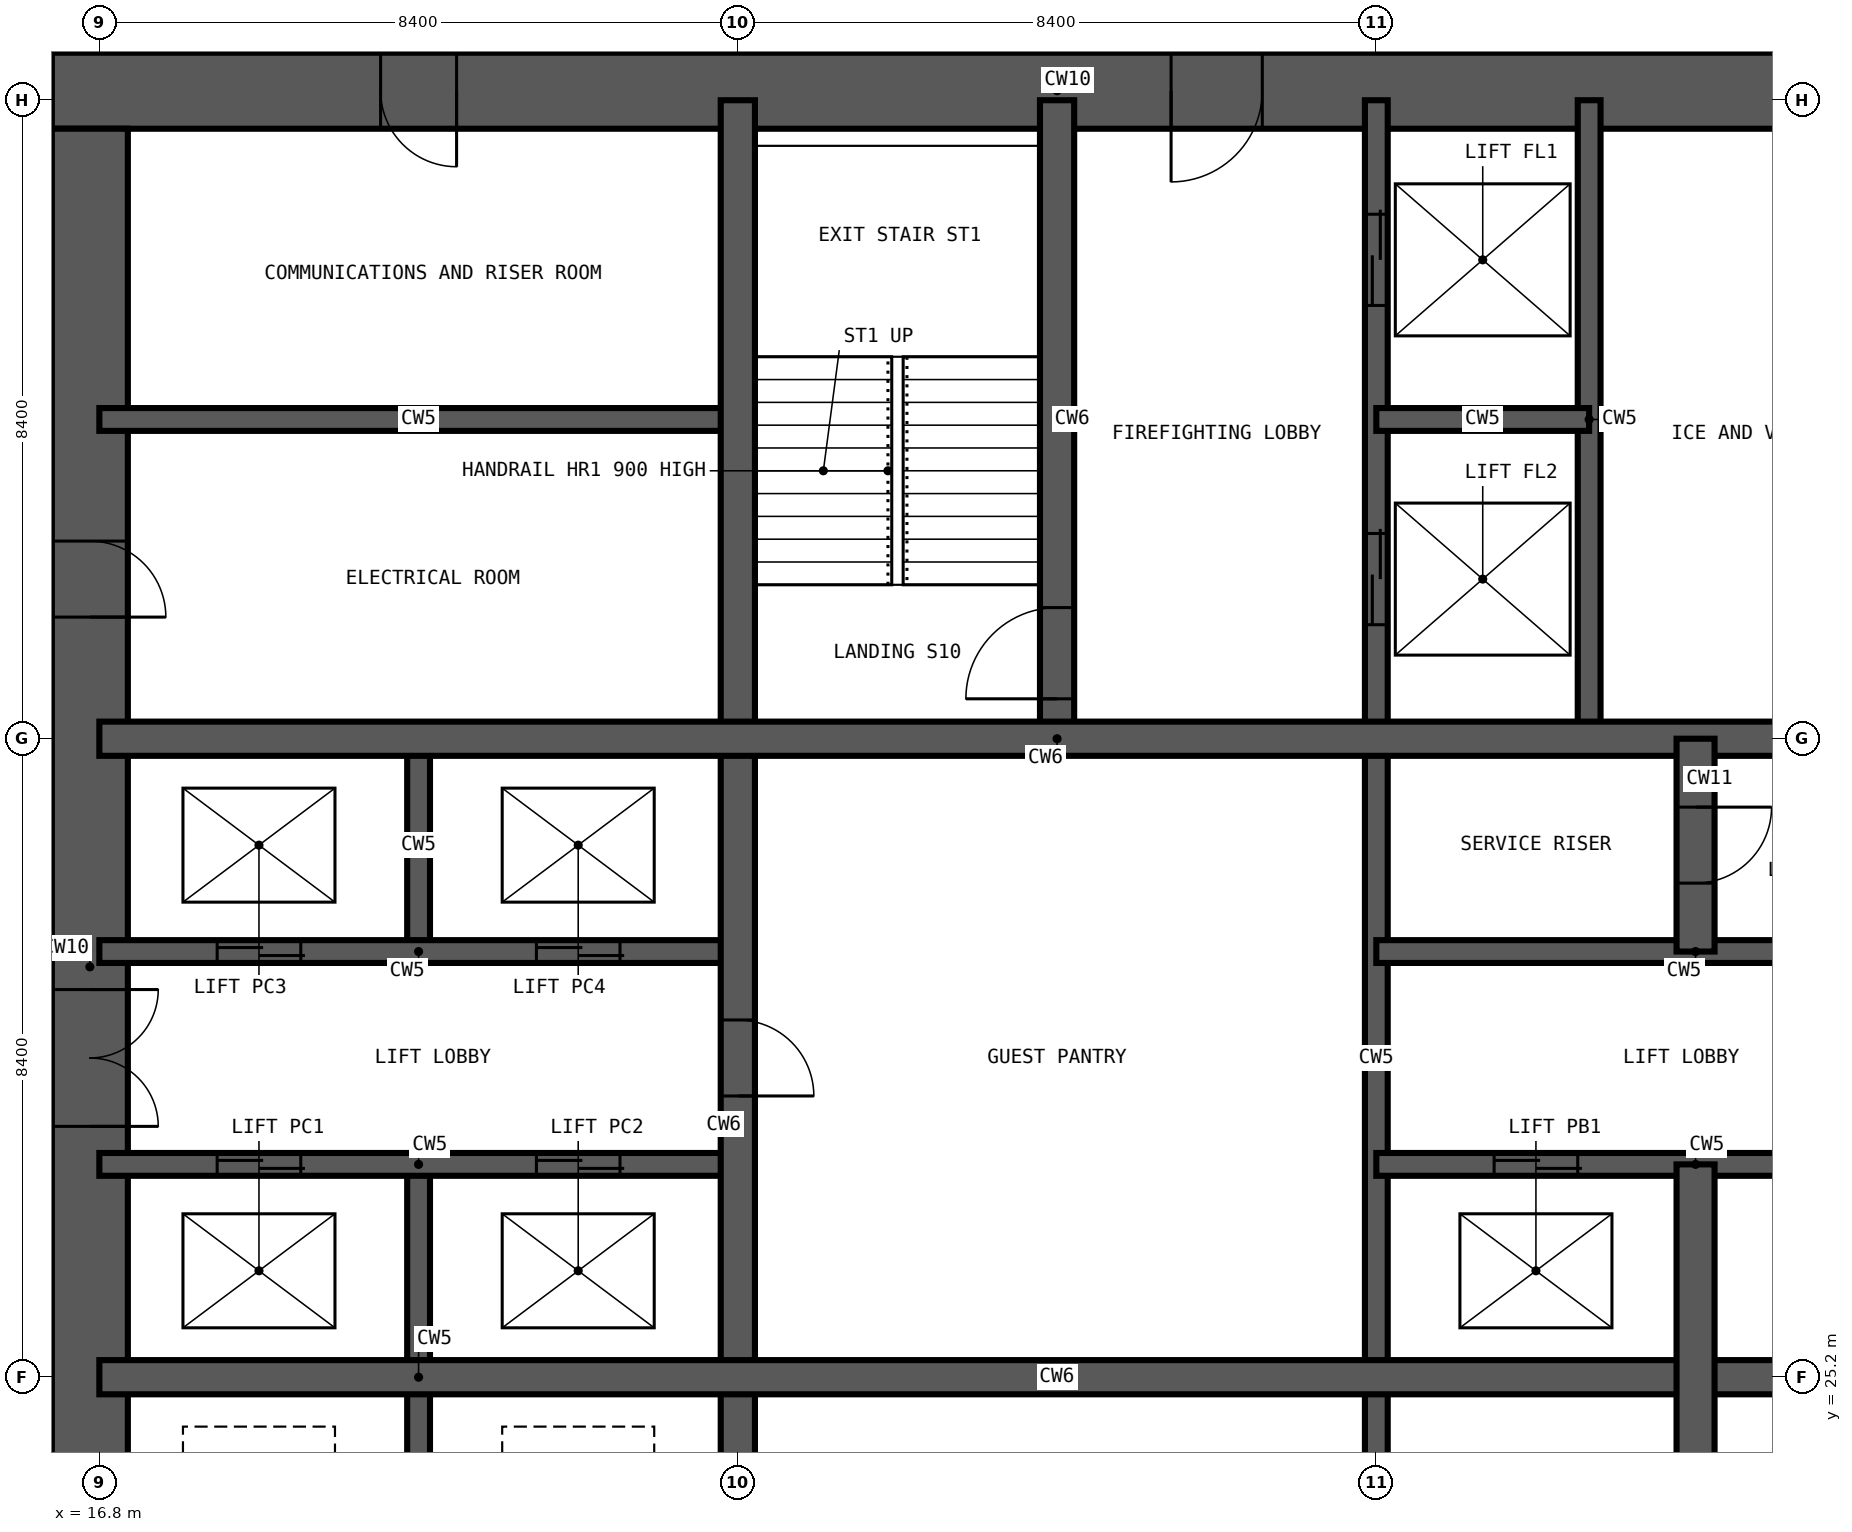
"""IFC4 building model, lengths in metres.
Left out: names, types, materials, properties, quantities, classifications, styles, units other than length and angle.
Written with IfcOpenShell. Run it as: python <this file> out.ifc"""

import sys

from ifc_helpers import new_model, si_unit, direction, frame, frame_2d, origin, place, context, subcontext, project, spatial, rectangle, extrude, element, fill, save


model = new_model("IFC4")
c1 = context("Model", 3, precision=1e-05, world=origin(), true_north=direction((0.0, 1.0)))
c2 = subcontext(c1, "Body", "Model", "MODEL_VIEW")
j1 = project(units=[si_unit("LENGTHUNIT", "METRE"), si_unit("PLANEANGLEUNIT", "RADIAN")], contexts=[c1])
p1 = place(None, origin())
s1 = spatial("IfcSite", under=j1, at=p1, CompositionType="ELEMENT")
p2 = place(p1, origin())
s2 = spatial("IfcBuilding", under=s1, at=p2, CompositionType="ELEMENT")
p3 = place(p2, frame((0.0, 0.0, 133.2)))
s3 = spatial("IfcBuildingStorey", under=s2, at=p3, CompositionType="ELEMENT", Elevation=133.2)
p4 = place(p3, frame((42.625, 42.125, -0.35), z_axis=(0.0, 0.0, 1.0), x_axis=(-1.0, 0.0, 0.0)))
e1 = element("IfcWall", 1, at=p4, inside=s3, PredefinedType="SHEAR", context=c2, shape_type="SweptSolid", body=[
    extrude(rectangle(XDim=26.45, YDim=1.0, at=frame_2d((13.225, 0.0))), origin(), (0.0, 0.0, 1.0), 3.6),
])
p5 = place(p4, frame((21.125, 0.0, 0.35)))
e2 = element("IfcOpeningElement", 2, at=p5, cuts=e1, PredefinedType="OPENING", context=c2, shape_type="SweptSolid", body=[
    extrude(rectangle(XDim=1.0, YDim=2.1, at=frame_2d((0.5, 1.05))), frame((0.0, 0.51, 0.0), z_axis=(0.0, -1.0, 0.0), x_axis=(1.0, 0.0, 0.0)), (0.0, 0.0, 1.0), 1.02),
])
p6 = place(p4, frame((10.525, 0.0, 0.35)))
e3 = element("IfcOpeningElement", 3, at=p6, cuts=e1, PredefinedType="OPENING", context=c2, shape_type="SweptSolid", body=[
    extrude(rectangle(XDim=1.2, YDim=2.2, at=frame_2d((0.6, 1.1))), frame((0.0, 0.51, 0.0), z_axis=(0.0, -1.0, 0.0), x_axis=(1.0, 0.0, 0.0)), (0.0, 0.0, 1.0), 1.02),
])
p7 = place(p3, frame((16.675, 41.625, -0.35), z_axis=(0.0, 0.0, 1.0), x_axis=(0.0, -1.0, 0.0)))
e4 = element("IfcWall", 4, at=p7, inside=s3, PredefinedType="SHEAR", context=c2, shape_type="SweptSolid", body=[
    extrude(rectangle(XDim=24.45, YDim=1.0, at=frame_2d((12.225, 0.0))), origin(), (0.0, 0.0, 1.0), 3.6),
])
p8 = place(p7, frame((11.325, 0.0, 0.35)))
e5 = element("IfcOpeningElement", 5, at=p8, cuts=e4, PredefinedType="OPENING", context=c2, shape_type="SweptSolid", body=[
    extrude(rectangle(XDim=1.8, YDim=2.2, at=frame_2d((0.9, 1.1))), frame((0.0, 0.51, 0.0), z_axis=(0.0, -1.0, 0.0), x_axis=(1.0, 0.0, 0.0)), (0.0, 0.0, 1.0), 1.02),
])
p9 = place(p7, frame((20.125, 0.0, 0.35)))
e6 = element("IfcOpeningElement", 6, at=p9, cuts=e4, PredefinedType="OPENING", context=c2, shape_type="SweptSolid", body=[
    extrude(rectangle(XDim=1.0, YDim=2.1, at=frame_2d((0.5, 1.05))), frame((0.0, 0.51, 0.0), z_axis=(0.0, -1.0, 0.0), x_axis=(1.0, 0.0, 0.0)), (0.0, 0.0, 1.0), 1.02),
])
p10 = place(p7, frame((5.425, 0.0, 0.35)))
e7 = element("IfcOpeningElement", 7, at=p10, cuts=e4, PredefinedType="OPENING", context=c2, shape_type="SweptSolid", body=[
    extrude(rectangle(XDim=1.0, YDim=2.1, at=frame_2d((0.5, 1.05))), frame((0.0, 0.51, 0.0), z_axis=(0.0, -1.0, 0.0), x_axis=(1.0, 0.0, 0.0)), (0.0, 0.0, 1.0), 1.02),
])
p11 = place(p3, frame((21.0, 22.4, -0.35), z_axis=(0.0, 0.0, 1.0), x_axis=(0.0, 1.0, 0.0)))
e8 = element("IfcWall", 8, at=p11, inside=s3, PredefinedType="SHEAR", context=c2, shape_type="SweptSolid", body=[
    extrude(rectangle(XDim=5.6, YDim=0.3, at=frame_2d((2.8, 0.0))), origin(), (0.0, 0.0, 1.0), 3.6),
])
p12 = place(p3, frame((21.0, 30.8, -0.35), z_axis=(0.0, 0.0, 1.0), x_axis=(0.0, 1.0, 0.0)))
e9 = element("IfcWall", 9, at=p12, inside=s3, PredefinedType="SHEAR", context=c2, shape_type="SweptSolid", body=[
    extrude(rectangle(XDim=2.8, YDim=0.3, at=frame_2d((1.4, 0.0))), origin(), (0.0, 0.0, 1.0), 3.6),
])
p13 = place(p3, frame((33.6, 16.8, -0.35), z_axis=(0.0, 0.0, 1.0), x_axis=(0.0, 1.0, 0.0)))
e10 = element("IfcWall", 10, at=p13, inside=s3, PredefinedType="SHEAR", context=c2, shape_type="SweptSolid", body=[
    extrude(rectangle(XDim=25.2, YDim=0.3, at=frame_2d((12.6, 0.0))), origin(), (0.0, 0.0, 1.0), 3.6),
])
p14 = place(p13, frame((22.5, 0.0, 0.35)))
e11 = element("IfcOpeningElement", 11, at=p14, cuts=e10, PredefinedType="OPENING", context=c2, shape_type="SweptSolid", body=[
    extrude(rectangle(XDim=1.2, YDim=2.2, at=frame_2d((0.6, 1.1))), frame((0.0, 0.16, 0.0), z_axis=(0.0, -1.0, 0.0), x_axis=(1.0, 0.0, 0.0)), (0.0, 0.0, 1.0), 0.32),
])
p15 = place(p13, frame((18.3, 0.0, 0.35)))
e12 = element("IfcOpeningElement", 12, at=p15, cuts=e10, PredefinedType="OPENING", context=c2, shape_type="SweptSolid", body=[
    extrude(rectangle(XDim=1.2, YDim=2.2, at=frame_2d((0.6, 1.1))), frame((0.0, 0.16, 0.0), z_axis=(0.0, -1.0, 0.0), x_axis=(1.0, 0.0, 0.0)), (0.0, 0.0, 1.0), 0.32),
])
p16 = place(p3, frame((36.4, 33.6, -0.35), z_axis=(0.0, 0.0, 1.0), x_axis=(0.0, 1.0, 0.0)))
e13 = element("IfcWall", 13, at=p16, inside=s3, PredefinedType="SHEAR", context=c2, shape_type="SweptSolid", body=[
    extrude(rectangle(XDim=8.4, YDim=0.3, at=frame_2d((4.2, 0.0))), origin(), (0.0, 0.0, 1.0), 3.6),
])
p17 = place(p3, frame((16.8, 28.0, -0.35), z_axis=(0.0, 0.0, 1.0), x_axis=(1.0, 0.0, 0.0)))
e14 = element("IfcWall", 14, at=p17, inside=s3, PredefinedType="SHEAR", context=c2, shape_type="SweptSolid", body=[
    extrude(rectangle(XDim=8.4, YDim=0.3, at=frame_2d((4.2, 0.0))), origin(), (0.0, 0.0, 1.0), 3.6),
])
p18 = place(p17, frame((1.55, 0.0, 0.35)))
e15 = element("IfcOpeningElement", 15, at=p18, cuts=e14, PredefinedType="OPENING", context=c2, shape_type="SweptSolid", body=[
    extrude(rectangle(XDim=1.1, YDim=2.2, at=frame_2d((0.55, 1.1))), frame((0.0, 0.16, 0.0), z_axis=(0.0, -1.0, 0.0), x_axis=(1.0, 0.0, 0.0)), (0.0, 0.0, 1.0), 0.32),
])
p19 = place(p17, frame((5.75, 0.0, 0.35)))
e16 = element("IfcOpeningElement", 16, at=p19, cuts=e14, PredefinedType="OPENING", context=c2, shape_type="SweptSolid", body=[
    extrude(rectangle(XDim=1.1, YDim=2.2, at=frame_2d((0.55, 1.1))), frame((0.0, 0.16, 0.0), z_axis=(0.0, -1.0, 0.0), x_axis=(1.0, 0.0, 0.0)), (0.0, 0.0, 1.0), 0.32),
])
p20 = place(p3, frame((33.6, 28.0, -0.35), z_axis=(0.0, 0.0, 1.0), x_axis=(1.0, 0.0, 0.0)))
e17 = element("IfcWall", 17, at=p20, inside=s3, PredefinedType="SHEAR", context=c2, shape_type="SweptSolid", body=[
    extrude(rectangle(XDim=8.4, YDim=0.3, at=frame_2d((4.2, 0.0))), origin(), (0.0, 0.0, 1.0), 3.6),
])
p21 = place(p20, frame((1.55, 0.0, 0.35)))
e18 = element("IfcOpeningElement", 18, at=p21, cuts=e17, PredefinedType="OPENING", context=c2, shape_type="SweptSolid", body=[
    extrude(rectangle(XDim=1.1, YDim=2.2, at=frame_2d((0.55, 1.1))), frame((0.0, 0.16, 0.0), z_axis=(0.0, -1.0, 0.0), x_axis=(1.0, 0.0, 0.0)), (0.0, 0.0, 1.0), 0.32),
])
p22 = place(p20, frame((5.75, 0.0, 0.35)))
e19 = element("IfcOpeningElement", 19, at=p22, cuts=e17, PredefinedType="OPENING", context=c2, shape_type="SweptSolid", body=[
    extrude(rectangle(XDim=1.1, YDim=2.2, at=frame_2d((0.55, 1.1))), frame((0.0, 0.16, 0.0), z_axis=(0.0, -1.0, 0.0), x_axis=(1.0, 0.0, 0.0)), (0.0, 0.0, 1.0), 0.32),
])
p23 = place(p3, frame((16.8, 30.8, -0.35), z_axis=(0.0, 0.0, 1.0), x_axis=(1.0, 0.0, 0.0)))
e20 = element("IfcWall", 20, at=p23, inside=s3, PredefinedType="SHEAR", context=c2, shape_type="SweptSolid", body=[
    extrude(rectangle(XDim=8.4, YDim=0.3, at=frame_2d((4.2, 0.0))), origin(), (0.0, 0.0, 1.0), 3.6),
])
p24 = place(p23, frame((1.55, 0.0, 0.35)))
e21 = element("IfcOpeningElement", 21, at=p24, cuts=e20, PredefinedType="OPENING", context=c2, shape_type="SweptSolid", body=[
    extrude(rectangle(XDim=1.1, YDim=2.2, at=frame_2d((0.55, 1.1))), frame((0.0, 0.16, 0.0), z_axis=(0.0, -1.0, 0.0), x_axis=(1.0, 0.0, 0.0)), (0.0, 0.0, 1.0), 0.32),
])
p25 = place(p23, frame((5.75, 0.0, 0.35)))
e22 = element("IfcOpeningElement", 22, at=p25, cuts=e20, PredefinedType="OPENING", context=c2, shape_type="SweptSolid", body=[
    extrude(rectangle(XDim=1.1, YDim=2.2, at=frame_2d((0.55, 1.1))), frame((0.0, 0.16, 0.0), z_axis=(0.0, -1.0, 0.0), x_axis=(1.0, 0.0, 0.0)), (0.0, 0.0, 1.0), 0.32),
])
for number, where, z_axis, x_axis in (
    (23, (33.6, 30.8, -0.35), (0.0, 0.0, 1.0), (1.0, 0.0, 0.0)),
    (24, (16.8, 37.8, -0.35), (0.0, 0.0, 1.0), (1.0, 0.0, 0.0)),
):
    element("IfcWall", number, at=place(p3, frame(where, z_axis=z_axis, x_axis=x_axis)), inside=s3, PredefinedType="SHEAR", context=c2, shape_type="SweptSolid", body=[
        extrude(rectangle(XDim=8.4, YDim=0.3, at=frame_2d((4.2, 0.0))), origin(), (0.0, 0.0, 1.0), 3.6),
    ])
p26 = place(p3, frame((33.6, 37.8, -0.35), z_axis=(0.0, 0.0, 1.0), x_axis=(1.0, 0.0, 0.0)))
e25 = element("IfcWall", 25, at=p26, inside=s3, PredefinedType="SHEAR", context=c2, shape_type="SweptSolid", body=[
    extrude(rectangle(XDim=2.8, YDim=0.3, at=frame_2d((1.4, 0.0))), origin(), (0.0, 0.0, 1.0), 3.6),
])
p27 = place(p3, frame((25.2, 16.8, -0.35), z_axis=(0.0, 0.0, 1.0), x_axis=(0.0, 1.0, 0.0)))
e26 = element("IfcWall", 26, at=p27, inside=s3, PredefinedType="SHEAR", context=c2, shape_type="SweptSolid", body=[
    extrude(rectangle(XDim=25.2, YDim=0.45, at=frame_2d((12.6, 0.0))), origin(), (0.0, 0.0, 1.0), 3.6),
])
p28 = place(p27, frame((12.1, 0.0, 0.35)))
e27 = element("IfcOpeningElement", 27, at=p28, cuts=e26, PredefinedType="OPENING", context=c2, shape_type="SweptSolid", body=[
    extrude(rectangle(XDim=1.0, YDim=2.1, at=frame_2d((0.5, 1.05))), frame((0.0, 0.235, 0.0), z_axis=(0.0, -1.0, 0.0), x_axis=(1.0, 0.0, 0.0)), (0.0, 0.0, 1.0), 0.47),
])
p29 = place(p3, frame((29.4, 33.6, -0.35), z_axis=(0.0, 0.0, 1.0), x_axis=(0.0, 1.0, 0.0)))
e28 = element("IfcWall", 28, at=p29, inside=s3, PredefinedType="SHEAR", context=c2, shape_type="SweptSolid", body=[
    extrude(rectangle(XDim=8.4, YDim=0.45, at=frame_2d((4.2, 0.0))), origin(), (0.0, 0.0, 1.0), 3.6),
])
p30 = place(p29, frame((0.525, 0.0, 0.35)))
e29 = element("IfcOpeningElement", 29, at=p30, cuts=e28, PredefinedType="OPENING", context=c2, shape_type="SweptSolid", body=[
    extrude(rectangle(XDim=1.2, YDim=2.2, at=frame_2d((0.6, 1.1))), frame((0.0, 0.235, 0.0), z_axis=(0.0, -1.0, 0.0), x_axis=(1.0, 0.0, 0.0)), (0.0, 0.0, 1.0), 0.47),
])
p31 = place(p3, frame((16.8, 25.2, -0.35), z_axis=(0.0, 0.0, 1.0), x_axis=(1.0, 0.0, 0.0)))
e30 = element("IfcWall", 30, at=p31, inside=s3, PredefinedType="SHEAR", context=c2, shape_type="SweptSolid", body=[
    extrude(rectangle(XDim=25.2, YDim=0.45, at=frame_2d((12.6, 0.0))), origin(), (0.0, 0.0, 1.0), 3.6),
])
p32 = place(p3, frame((16.8, 33.6, -0.35), z_axis=(0.0, 0.0, 1.0), x_axis=(1.0, 0.0, 0.0)))
e31 = element("IfcWall", 31, at=p32, inside=s3, PredefinedType="SHEAR", context=c2, shape_type="SweptSolid", body=[
    extrude(rectangle(XDim=25.2, YDim=0.45, at=frame_2d((12.6, 0.0))), origin(), (0.0, 0.0, 1.0), 3.6),
])
p33 = place(p32, frame((22.6, 0.0, 0.35)))
e32 = element("IfcOpeningElement", 32, at=p33, cuts=e31, PredefinedType="OPENING", context=c2, shape_type="SweptSolid", body=[
    extrude(rectangle(XDim=1.0, YDim=2.1, at=frame_2d((0.5, 1.05))), frame((0.0, 0.235, 0.0), z_axis=(0.0, -1.0, 0.0), x_axis=(1.0, 0.0, 0.0)), (0.0, 0.0, 1.0), 0.47),
])
p34 = place(p3, frame((37.8, 16.8, -0.35), z_axis=(0.0, 0.0, 1.0), x_axis=(0.0, 1.0, 0.0)))
e33 = element("IfcWall", 33, at=p34, inside=s3, PredefinedType="SHEAR", context=c2, shape_type="SweptSolid", body=[
    extrude(rectangle(XDim=11.2, YDim=0.5, at=frame_2d((5.6, 0.0))), origin(), (0.0, 0.0, 1.0), 3.6),
])
p35 = place(p3, frame((37.8, 30.8, -0.35), z_axis=(0.0, 0.0, 1.0), x_axis=(0.0, 1.0, 0.0)))
e34 = element("IfcWall", 34, at=p35, inside=s3, PredefinedType="SHEAR", context=c2, shape_type="SweptSolid", body=[
    extrude(rectangle(XDim=2.8, YDim=0.5, at=frame_2d((1.4, 0.0))), origin(), (0.0, 0.0, 1.0), 3.6),
])
p36 = place(p35, frame((0.9, 0.0, 0.35)))
e35 = element("IfcOpeningElement", 35, at=p36, cuts=e34, PredefinedType="OPENING", context=c2, shape_type="SweptSolid", body=[
    extrude(rectangle(XDim=1.0, YDim=2.1, at=frame_2d((0.5, 1.05))), frame((0.0, 0.26, 0.0), z_axis=(0.0, -1.0, 0.0), x_axis=(1.0, 0.0, 0.0)), (0.0, 0.0, 1.0), 0.52),
])
p37 = place(p30, origin())
e36 = element("IfcDoor", 36, at=p37, inside=s3, OperationType="SINGLE_SWING_LEFT", PredefinedType="DOOR", context=c2, shape_type="SweptSolid", body=[
    extrude(rectangle(XDim=1.2, YDim=2.2, at=frame_2d((0.6, 1.1))), frame((0.0, 0.025, 0.0), z_axis=(0.0, -1.0, 0.0), x_axis=(1.0, 0.0, 0.0)), (0.0, 0.0, 1.0), 0.05),
])
fill(e29, e36)
p38 = place(p21, origin())
e37 = element("IfcDoor", 37, at=p38, inside=s3, OperationType="DOUBLE_DOOR_SLIDING", PredefinedType="DOOR", context=c2, shape_type="SweptSolid", body=[
    extrude(rectangle(XDim=1.1, YDim=2.2, at=frame_2d((0.55, 1.1))), frame((0.0, 0.025, 0.0), z_axis=(0.0, -1.0, 0.0), x_axis=(1.0, 0.0, 0.0)), (0.0, 0.0, 1.0), 0.05),
])
fill(e18, e37)
p39 = place(p18, origin())
e38 = element("IfcDoor", 38, at=p39, inside=s3, OperationType="DOUBLE_DOOR_SLIDING", PredefinedType="DOOR", context=c2, shape_type="SweptSolid", body=[
    extrude(rectangle(XDim=1.1, YDim=2.2, at=frame_2d((0.55, 1.1))), frame((0.0, 0.025, 0.0), z_axis=(0.0, -1.0, 0.0), x_axis=(1.0, 0.0, 0.0)), (0.0, 0.0, 1.0), 0.05),
])
fill(e15, e38)
p40 = place(p19, origin())
e39 = element("IfcDoor", 39, at=p40, inside=s3, OperationType="DOUBLE_DOOR_SLIDING", PredefinedType="DOOR", context=c2, shape_type="SweptSolid", body=[
    extrude(rectangle(XDim=1.1, YDim=2.2, at=frame_2d((0.55, 1.1))), frame((0.0, 0.025, 0.0), z_axis=(0.0, -1.0, 0.0), x_axis=(1.0, 0.0, 0.0)), (0.0, 0.0, 1.0), 0.05),
])
fill(e16, e39)
p41 = place(p24, origin())
e40 = element("IfcDoor", 40, at=p41, inside=s3, OperationType="DOUBLE_DOOR_SLIDING", PredefinedType="DOOR", context=c2, shape_type="SweptSolid", body=[
    extrude(rectangle(XDim=1.1, YDim=2.2, at=frame_2d((0.55, 1.1))), frame((0.0, 0.025, 0.0), z_axis=(0.0, -1.0, 0.0), x_axis=(1.0, 0.0, 0.0)), (0.0, 0.0, 1.0), 0.05),
])
fill(e21, e40)
p42 = place(p25, origin())
e41 = element("IfcDoor", 41, at=p42, inside=s3, OperationType="DOUBLE_DOOR_SLIDING", PredefinedType="DOOR", context=c2, shape_type="SweptSolid", body=[
    extrude(rectangle(XDim=1.1, YDim=2.2, at=frame_2d((0.55, 1.1))), frame((0.0, 0.025, 0.0), z_axis=(0.0, -1.0, 0.0), x_axis=(1.0, 0.0, 0.0)), (0.0, 0.0, 1.0), 0.05),
])
fill(e22, e41)
p43 = place(p14, origin())
e42 = element("IfcDoor", 42, at=p43, inside=s3, OperationType="DOUBLE_DOOR_SLIDING", PredefinedType="DOOR", context=c2, shape_type="SweptSolid", body=[
    extrude(rectangle(XDim=1.2, YDim=2.2, at=frame_2d((0.6, 1.1))), frame((0.0, 0.025, 0.0), z_axis=(0.0, -1.0, 0.0), x_axis=(1.0, 0.0, 0.0)), (0.0, 0.0, 1.0), 0.05),
])
fill(e11, e42)
p44 = place(p15, origin())
e43 = element("IfcDoor", 43, at=p44, inside=s3, OperationType="DOUBLE_DOOR_SLIDING", PredefinedType="DOOR", context=c2, shape_type="SweptSolid", body=[
    extrude(rectangle(XDim=1.2, YDim=2.2, at=frame_2d((0.6, 1.1))), frame((0.0, 0.025, 0.0), z_axis=(0.0, -1.0, 0.0), x_axis=(1.0, 0.0, 0.0)), (0.0, 0.0, 1.0), 0.05),
])
fill(e12, e43)
p45 = place(p8, origin())
e44 = element("IfcDoor", 44, at=p45, inside=s3, OperationType="DOUBLE_DOOR_DOUBLE_SWING", PredefinedType="DOOR", context=c2, shape_type="SweptSolid", body=[
    extrude(rectangle(XDim=1.8, YDim=2.2, at=frame_2d((0.9, 1.1))), frame((0.0, 0.025, 0.0), z_axis=(0.0, -1.0, 0.0), x_axis=(1.0, 0.0, 0.0)), (0.0, 0.0, 1.0), 0.05),
])
fill(e5, e44)
p46 = place(p10, origin())
e45 = element("IfcDoor", 45, at=p46, inside=s3, OperationType="SINGLE_SWING_RIGHT", PredefinedType="DOOR", context=c2, shape_type="SweptSolid", body=[
    extrude(rectangle(XDim=1.0, YDim=2.1, at=frame_2d((0.5, 1.05))), frame((0.0, 0.025, 0.0), z_axis=(0.0, -1.0, 0.0), x_axis=(1.0, 0.0, 0.0)), (0.0, 0.0, 1.0), 0.05),
])
fill(e7, e45)
p47 = place(p5, origin())
e46 = element("IfcDoor", 46, at=p47, inside=s3, OperationType="SINGLE_SWING_LEFT", PredefinedType="DOOR", context=c2, shape_type="SweptSolid", body=[
    extrude(rectangle(XDim=1.0, YDim=2.1, at=frame_2d((0.5, 1.05))), frame((0.0, 0.025, 0.0), z_axis=(0.0, -1.0, 0.0), x_axis=(1.0, 0.0, 0.0)), (0.0, 0.0, 1.0), 0.05),
])
fill(e2, e46)
p48 = place(p28, frame((1.0, 0.0, 0.0), z_axis=(0.0, 0.0, 1.0), x_axis=(-1.0, 0.0, 0.0)))
e47 = element("IfcDoor", 47, at=p48, inside=s3, OperationType="SINGLE_SWING_RIGHT", PredefinedType="DOOR", context=c2, shape_type="SweptSolid", body=[
    extrude(rectangle(XDim=1.0, YDim=2.1, at=frame_2d((0.5, 1.05))), frame((0.0, 0.025, 0.0), z_axis=(0.0, -1.0, 0.0), x_axis=(1.0, 0.0, 0.0)), (0.0, 0.0, 1.0), 0.05),
])
fill(e27, e47)
p49 = place(p36, frame((1.0, 0.0, 0.0), z_axis=(0.0, 0.0, 1.0), x_axis=(-1.0, 0.0, 0.0)))
e48 = element("IfcDoor", 48, at=p49, inside=s3, OperationType="SINGLE_SWING_LEFT", PredefinedType="DOOR", context=c2, shape_type="SweptSolid", body=[
    extrude(rectangle(XDim=1.0, YDim=2.1, at=frame_2d((0.5, 1.05))), frame((0.0, 0.025, 0.0), z_axis=(0.0, -1.0, 0.0), x_axis=(1.0, 0.0, 0.0)), (0.0, 0.0, 1.0), 0.05),
])
fill(e35, e48)
p50 = place(p6, origin())
e49 = element("IfcDoor", 49, at=p50, inside=s3, OperationType="SINGLE_SWING_RIGHT", PredefinedType="DOOR", context=c2, shape_type="SweptSolid", body=[
    extrude(rectangle(XDim=1.2, YDim=2.2, at=frame_2d((0.6, 1.1))), frame((0.0, 0.025, 0.0), z_axis=(0.0, -1.0, 0.0), x_axis=(1.0, 0.0, 0.0)), (0.0, 0.0, 1.0), 0.05),
])
fill(e3, e49)
save(model, sys.argv[1])
